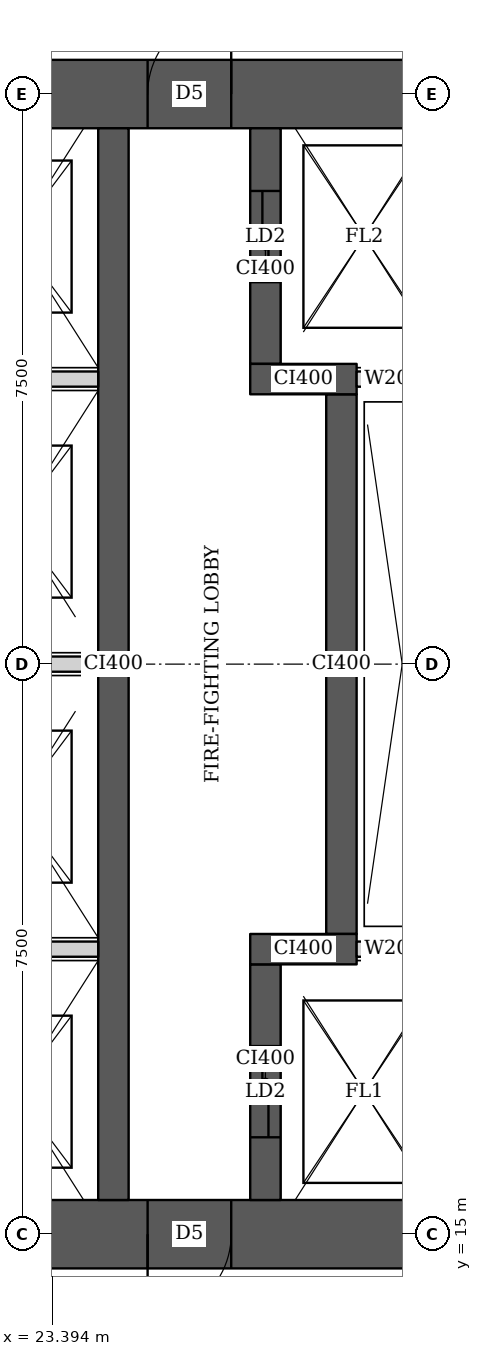
"""IFC4 building model, lengths in metres.
Left out: names, types, materials, properties, quantities, classifications, styles, units other than length and angle.
Written with IfcOpenShell. Run it as: python <this file> out.ifc"""

import sys

from ifc_helpers import new_model, si_unit, direction, frame, frame_2d, origin, place, context, subcontext, project, spatial, rectangle, extrude, element, fill, save


model = new_model("IFC4")
c1 = context("Model", 3, precision=1e-05, world=origin(), true_north=direction((0.0, 1.0)))
c2 = subcontext(c1, "Body", "Model", "MODEL_VIEW")
j1 = project(units=[si_unit("LENGTHUNIT", "METRE"), si_unit("PLANEANGLEUNIT", "RADIAN")], contexts=[c1])
p1 = place(None, origin())
s1 = spatial("IfcSite", under=j1, at=p1, CompositionType="ELEMENT")
p2 = place(p1, origin())
s2 = spatial("IfcBuilding", under=s1, at=p2, CompositionType="ELEMENT")
p3 = place(p2, frame((0.0, 0.0, 274.1)))
s3 = spatial("IfcBuildingStorey", under=s2, at=p3, CompositionType="ELEMENT", Elevation=274.1)
p4 = place(p3, frame((13.95, 15.0, 0.0), z_axis=(0.0, 0.0, 1.0), x_axis=(1.0, 0.0, 0.0)))
e1 = element("IfcWall", 1, at=p4, inside=s3, PredefinedType="SHEAR", context=c2, shape_type="SweptSolid", body=[
    extrude(rectangle(XDim=15.3, YDim=0.9, at=frame_2d((7.65, 0.0))), origin(), (0.0, 0.0, 1.0), 3.75),
])
p5 = place(p4, frame((4.45, 0.0, 0.0)))
e2 = element("IfcOpeningElement", 2, at=p5, cuts=e1, PredefinedType="OPENING", context=c2, shape_type="SweptSolid", body=[
    extrude(rectangle(XDim=1.8, YDim=2.1, at=frame_2d((0.9, 1.05))), frame((0.0, 0.46, 0.0), z_axis=(0.0, -1.0, 0.0), x_axis=(1.0, 0.0, 0.0)), (0.0, 0.0, 1.0), 0.92),
])
p6 = place(p4, frame((10.7, 0.0, 0.0)))
e3 = element("IfcOpeningElement", 3, at=p6, cuts=e1, PredefinedType="OPENING", context=c2, shape_type="SweptSolid", body=[
    extrude(rectangle(XDim=1.1, YDim=2.1, at=frame_2d((0.55, 1.05))), frame((0.0, 0.46, 0.0), z_axis=(0.0, -1.0, 0.0), x_axis=(1.0, 0.0, 0.0)), (0.0, 0.0, 1.0), 0.92),
])
p7 = place(p3, frame((13.95, 30.0, 0.0), z_axis=(0.0, 0.0, 1.0), x_axis=(1.0, 0.0, 0.0)))
e4 = element("IfcWall", 4, at=p7, inside=s3, PredefinedType="SHEAR", context=c2, shape_type="SweptSolid", body=[
    extrude(rectangle(XDim=15.3, YDim=0.9, at=frame_2d((7.65, 0.0))), origin(), (0.0, 0.0, 1.0), 3.75),
])
p8 = place(p7, frame((4.45, 0.0, 0.0)))
e5 = element("IfcOpeningElement", 5, at=p8, cuts=e4, PredefinedType="OPENING", context=c2, shape_type="SweptSolid", body=[
    extrude(rectangle(XDim=1.8, YDim=2.1, at=frame_2d((0.9, 1.05))), frame((0.0, 0.46, 0.0), z_axis=(0.0, -1.0, 0.0), x_axis=(1.0, 0.0, 0.0)), (0.0, 0.0, 1.0), 0.92),
])
p9 = place(p7, frame((10.7, 0.0, 0.0)))
e6 = element("IfcOpeningElement", 6, at=p9, cuts=e4, PredefinedType="OPENING", context=c2, shape_type="SweptSolid", body=[
    extrude(rectangle(XDim=1.1, YDim=2.1, at=frame_2d((0.55, 1.05))), frame((0.0, 0.46, 0.0), z_axis=(0.0, -1.0, 0.0), x_axis=(1.0, 0.0, 0.0)), (0.0, 0.0, 1.0), 0.92),
])
p10 = place(p3, frame((24.2, 15.45, 0.0), z_axis=(0.0, 0.0, 1.0), x_axis=(0.0, 1.0, 0.0)))
e7 = element("IfcWall", 7, at=p10, inside=s3, PredefinedType="SHEAR", context=c2, shape_type="SweptSolid", body=[
    extrude(rectangle(XDim=14.1, YDim=0.4, at=frame_2d((7.05, 0.0))), origin(), (0.0, 0.0, 1.0), 3.75),
])
p11 = place(p3, frame((26.2, 15.45, 0.0), z_axis=(0.0, 0.0, 1.0), x_axis=(0.0, 1.0, 0.0)))
e8 = element("IfcWall", 8, at=p11, inside=s3, PredefinedType="SHEAR", context=c2, shape_type="SweptSolid", body=[
    extrude(rectangle(XDim=3.1, YDim=0.4, at=frame_2d((1.55, 0.0))), origin(), (0.0, 0.0, 1.0), 3.75),
])
p12 = place(p11, frame((0.825, 0.0, 0.0)))
e9 = element("IfcOpeningElement", 9, at=p12, cuts=e8, PredefinedType="OPENING", context=c2, shape_type="SweptSolid", body=[
    extrude(rectangle(XDim=1.2, YDim=2.1, at=frame_2d((0.6, 1.05))), frame((0.0, 0.21, 0.0), z_axis=(0.0, -1.0, 0.0), x_axis=(1.0, 0.0, 0.0)), (0.0, 0.0, 1.0), 0.42),
])
p13 = place(p3, frame((26.0, 18.75, 0.0), z_axis=(0.0, 0.0, 1.0), x_axis=(1.0, 0.0, 0.0)))
e10 = element("IfcWall", 10, at=p13, inside=s3, PredefinedType="SHEAR", context=c2, shape_type="SweptSolid", body=[
    extrude(rectangle(XDim=1.4, YDim=0.4, at=frame_2d((0.7, 0.0))), origin(), (0.0, 0.0, 1.0), 3.75),
])
p14 = place(p3, frame((27.2, 18.95, 0.0), z_axis=(0.0, 0.0, 1.0), x_axis=(0.0, 1.0, 0.0)))
e11 = element("IfcWall", 11, at=p14, inside=s3, PredefinedType="SHEAR", context=c2, shape_type="SweptSolid", body=[
    extrude(rectangle(XDim=7.1, YDim=0.4, at=frame_2d((3.55, 0.0))), origin(), (0.0, 0.0, 1.0), 3.75),
])
p15 = place(p3, frame((26.0, 26.25, 0.0), z_axis=(0.0, 0.0, 1.0), x_axis=(1.0, 0.0, 0.0)))
e12 = element("IfcWall", 12, at=p15, inside=s3, PredefinedType="SHEAR", context=c2, shape_type="SweptSolid", body=[
    extrude(rectangle(XDim=1.4, YDim=0.4, at=frame_2d((0.7, 0.0))), origin(), (0.0, 0.0, 1.0), 3.75),
])
p16 = place(p3, frame((26.2, 26.45, 0.0), z_axis=(0.0, 0.0, 1.0), x_axis=(0.0, 1.0, 0.0)))
e13 = element("IfcWall", 13, at=p16, inside=s3, PredefinedType="SHEAR", context=c2, shape_type="SweptSolid", body=[
    extrude(rectangle(XDim=3.1, YDim=0.4, at=frame_2d((1.55, 0.0))), origin(), (0.0, 0.0, 1.0), 3.75),
])
p17 = place(p16, frame((1.075, 0.0, 0.0)))
e14 = element("IfcOpeningElement", 14, at=p17, cuts=e13, PredefinedType="OPENING", context=c2, shape_type="SweptSolid", body=[
    extrude(rectangle(XDim=1.2, YDim=2.1, at=frame_2d((0.6, 1.05))), frame((0.0, 0.21, 0.0), z_axis=(0.0, -1.0, 0.0), x_axis=(1.0, 0.0, 0.0)), (0.0, 0.0, 1.0), 0.42),
])
for number, where, z_axis, x_axis in (
    (15, (21.8, 18.75, 0.0), (0.0, 0.0, 1.0), (1.0, 0.0, 0.0)),
    (16, (21.8, 22.5, 0.0), (0.0, 0.0, 1.0), (1.0, 0.0, 0.0)),
    (17, (21.8, 26.25, 0.0), (0.0, 0.0, 1.0), (1.0, 0.0, 0.0)),
):
    element("IfcWall", number, at=place(p3, frame(where, z_axis=z_axis, x_axis=x_axis)), inside=s3, PredefinedType="SOLIDWALL", context=c2, shape_type="SweptSolid", body=[
        extrude(rectangle(XDim=2.2, YDim=0.2, at=frame_2d((1.1, 0.0))), origin(), (0.0, 0.0, 1.0), 3.5),
    ])
for number, where, z_axis, x_axis in (
    (18, (27.4, 18.75, 0.0), (0.0, 0.0, 1.0), (1.0, 0.0, 0.0)),
    (19, (27.4, 26.25, 0.0), (0.0, 0.0, 1.0), (1.0, 0.0, 0.0)),
):
    element("IfcWall", number, at=place(p3, frame(where, z_axis=z_axis, x_axis=x_axis)), inside=s3, PredefinedType="SOLIDWALL", context=c2, shape_type="SweptSolid", body=[
        extrude(rectangle(XDim=0.95, YDim=0.2, at=frame_2d((0.475, 0.0))), origin(), (0.0, 0.0, 1.0), 3.5),
    ])
p18 = place(p6, origin())
e20 = element("IfcDoor", 20, at=p18, inside=s3, OperationType="SINGLE_SWING_RIGHT", PredefinedType="DOOR", context=c2, shape_type="SweptSolid", body=[
    extrude(rectangle(XDim=1.1, YDim=2.1, at=frame_2d((0.55, 1.05))), frame((0.0, 0.025, 0.0), z_axis=(0.0, -1.0, 0.0), x_axis=(1.0, 0.0, 0.0)), (0.0, 0.0, 1.0), 0.05),
])
fill(e3, e20)
p19 = place(p9, origin())
e21 = element("IfcDoor", 21, at=p19, inside=s3, OperationType="SINGLE_SWING_RIGHT", PredefinedType="DOOR", context=c2, shape_type="SweptSolid", body=[
    extrude(rectangle(XDim=1.1, YDim=2.1, at=frame_2d((0.55, 1.05))), frame((0.0, 0.025, 0.0), z_axis=(0.0, -1.0, 0.0), x_axis=(1.0, 0.0, 0.0)), (0.0, 0.0, 1.0), 0.05),
])
fill(e6, e21)
p20 = place(p12, origin())
e22 = element("IfcDoor", 22, at=p20, inside=s3, OperationType="DOUBLE_DOOR_SLIDING", PredefinedType="DOOR", context=c2, shape_type="SweptSolid", body=[
    extrude(rectangle(XDim=1.2, YDim=2.1, at=frame_2d((0.6, 1.05))), frame((0.0, 0.025, 0.0), z_axis=(0.0, -1.0, 0.0), x_axis=(1.0, 0.0, 0.0)), (0.0, 0.0, 1.0), 0.05),
])
fill(e9, e22)
p21 = place(p17, origin())
e23 = element("IfcDoor", 23, at=p21, inside=s3, OperationType="DOUBLE_DOOR_SLIDING", PredefinedType="DOOR", context=c2, shape_type="SweptSolid", body=[
    extrude(rectangle(XDim=1.2, YDim=2.1, at=frame_2d((0.6, 1.05))), frame((0.0, 0.025, 0.0), z_axis=(0.0, -1.0, 0.0), x_axis=(1.0, 0.0, 0.0)), (0.0, 0.0, 1.0), 0.05),
])
fill(e14, e23)
save(model, sys.argv[1])
